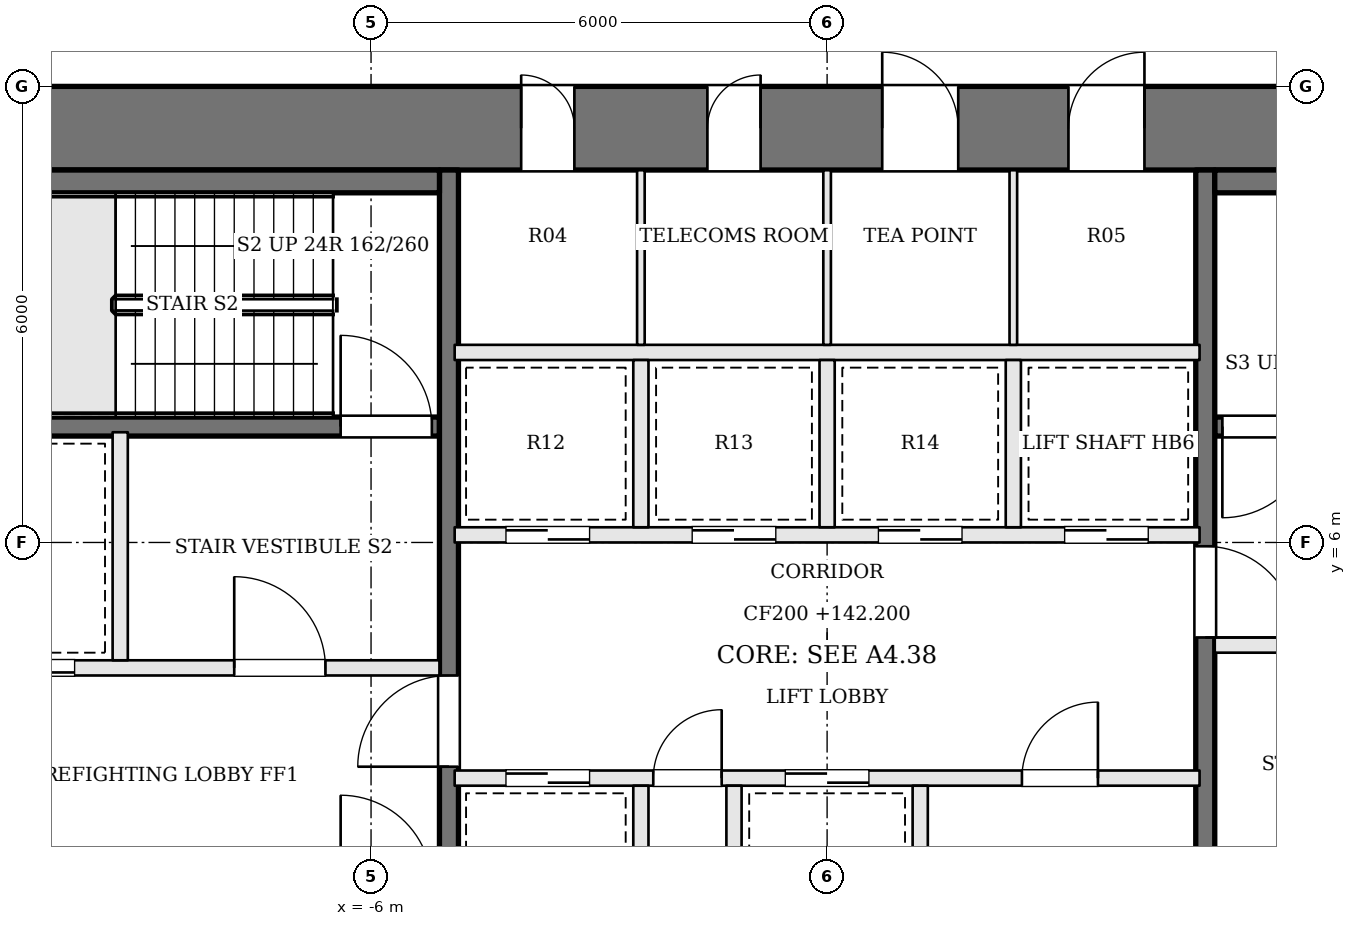
"""IFC4 building model, lengths in metres.
Left out: names, types, materials, properties, quantities, classifications, styles, units other than length and angle.
Written with IfcOpenShell. Run it as: python <this file> out.ifc"""

import sys

from ifc_helpers import new_model, si_unit, direction, frame, frame_2d, origin, place, context, subcontext, project, spatial, rectangle, extrude, element, fill, save


model = new_model("IFC4")
c1 = context("Model", 3, precision=1e-05, world=origin(), true_north=direction((0.0, 1.0)))
c2 = subcontext(c1, "Body", "Model", "MODEL_VIEW")
j1 = project(units=[si_unit("LENGTHUNIT", "METRE"), si_unit("PLANEANGLEUNIT", "RADIAN")], contexts=[c1])
p1 = place(None, origin())
s1 = spatial("IfcSite", under=j1, at=p1, CompositionType="ELEMENT")
p2 = place(p1, origin())
s2 = spatial("IfcBuilding", under=s1, at=p2, CompositionType="ELEMENT")
p3 = place(p2, frame((0.0, 0.0, 142.2)))
s3 = spatial("IfcBuildingStorey", under=s2, at=p3, CompositionType="ELEMENT", Elevation=142.2)
p4 = place(p3, frame((-13.0, 11.45, 0.0), z_axis=(0.0, 0.0, 1.0), x_axis=(1.0, 0.0, 0.0)))
e1 = element("IfcWall", 1, at=p4, inside=s3, PredefinedType="SHEAR", context=c2, shape_type="SweptSolid", body=[
    extrude(rectangle(XDim=26.0, YDim=1.1, at=frame_2d((13.0, 0.0))), origin(), (0.0, 0.0, 1.0), 3.9),
])
p5 = place(p4, frame((8.975, 0.0, 0.0)))
e2 = element("IfcOpeningElement", 2, at=p5, cuts=e1, PredefinedType="OPENING", context=c2, shape_type="SweptSolid", body=[
    extrude(rectangle(XDim=0.7, YDim=2.1, at=frame_2d((0.35, 1.05))), frame((0.0, 0.56, 0.0), z_axis=(0.0, -1.0, 0.0), x_axis=(1.0, 0.0, 0.0)), (0.0, 0.0, 1.0), 1.12),
])
p6 = place(p4, frame((11.425, 0.0, 0.0)))
e3 = element("IfcOpeningElement", 3, at=p6, cuts=e1, PredefinedType="OPENING", context=c2, shape_type="SweptSolid", body=[
    extrude(rectangle(XDim=0.7, YDim=2.1, at=frame_2d((0.35, 1.05))), frame((0.0, 0.56, 0.0), z_axis=(0.0, -1.0, 0.0), x_axis=(1.0, 0.0, 0.0)), (0.0, 0.0, 1.0), 1.12),
])
p7 = place(p4, frame((13.725, 0.0, 0.0)))
e4 = element("IfcOpeningElement", 4, at=p7, cuts=e1, PredefinedType="OPENING", context=c2, shape_type="SweptSolid", body=[
    extrude(rectangle(XDim=1.0, YDim=2.1, at=frame_2d((0.5, 1.05))), frame((0.0, 0.56, 0.0), z_axis=(0.0, -1.0, 0.0), x_axis=(1.0, 0.0, 0.0)), (0.0, 0.0, 1.0), 1.12),
])
p8 = place(p4, frame((16.175, 0.0, 0.0)))
e5 = element("IfcOpeningElement", 5, at=p8, cuts=e1, PredefinedType="OPENING", context=c2, shape_type="SweptSolid", body=[
    extrude(rectangle(XDim=1.0, YDim=2.1, at=frame_2d((0.5, 1.05))), frame((0.0, 0.56, 0.0), z_axis=(0.0, -1.0, 0.0), x_axis=(1.0, 0.0, 0.0)), (0.0, 0.0, 1.0), 1.12),
])
p9 = place(p3, frame((11.9, 7.525, 0.0), z_axis=(0.0, 0.0, 1.0), x_axis=(-1.0, 0.0, 0.0)))
e6 = element("IfcWall", 6, at=p9, inside=s3, PredefinedType="SOLIDWALL", context=c2, shape_type="SweptSolid", body=[
    extrude(rectangle(XDim=6.8, YDim=0.25, at=frame_2d((3.4, 0.0))), origin(), (0.0, 0.0, 1.0), 3.7),
])
p10 = place(p9, frame((5.5, 0.0, 0.0)))
e7 = element("IfcOpeningElement", 7, at=p10, cuts=e6, PredefinedType="OPENING", context=c2, shape_type="SweptSolid", body=[
    extrude(rectangle(XDim=1.2, YDim=2.1, at=frame_2d((0.6, 1.05))), frame((0.0, 0.135, 0.0), z_axis=(0.0, -1.0, 0.0), x_axis=(1.0, 0.0, 0.0)), (0.0, 0.0, 1.0), 0.27),
])
p11 = place(p3, frame((-11.9, 4.35, 0.0), z_axis=(0.0, 0.0, 1.0), x_axis=(1.0, 0.0, 0.0)))
e8 = element("IfcWall", 8, at=p11, inside=s3, PredefinedType="SOLIDWALL", context=c2, shape_type="SweptSolid", body=[
    extrude(rectangle(XDim=6.8, YDim=0.2, at=frame_2d((3.4, 0.0))), origin(), (0.0, 0.0, 1.0), 3.7),
])
p12 = place(p11, frame((4.1, 0.0, 0.0)))
e9 = element("IfcOpeningElement", 9, at=p12, cuts=e8, PredefinedType="OPENING", context=c2, shape_type="SweptSolid", body=[
    extrude(rectangle(XDim=1.2, YDim=2.1, at=frame_2d((0.6, 1.05))), frame((0.0, 0.11, 0.0), z_axis=(0.0, -1.0, 0.0), x_axis=(1.0, 0.0, 0.0)), (0.0, 0.0, 1.0), 0.22),
])
p13 = place(p11, frame((0.8, 0.0, 0.0)))
e10 = element("IfcOpeningElement", 10, at=p13, cuts=e8, PredefinedType="OPENING", context=c2, shape_type="SweptSolid", body=[
    extrude(rectangle(XDim=1.2, YDim=2.1, at=frame_2d((0.6, 1.05))), frame((0.0, 0.11, 0.0), z_axis=(0.0, -1.0, 0.0), x_axis=(1.0, 0.0, 0.0)), (0.0, 0.0, 1.0), 0.22),
])
p14 = place(p3, frame((11.9, 4.65, 0.0), z_axis=(0.0, 0.0, 1.0), x_axis=(-1.0, 0.0, 0.0)))
e11 = element("IfcWall", 11, at=p14, inside=s3, PredefinedType="SOLIDWALL", context=c2, shape_type="SweptSolid", body=[
    extrude(rectangle(XDim=6.8, YDim=0.2, at=frame_2d((3.4, 0.0))), origin(), (0.0, 0.0, 1.0), 3.7),
])
p15 = place(p14, frame((4.1, 0.0, 0.0)))
e12 = element("IfcOpeningElement", 12, at=p15, cuts=e11, PredefinedType="OPENING", context=c2, shape_type="SweptSolid", body=[
    extrude(rectangle(XDim=1.2, YDim=2.1, at=frame_2d((0.6, 1.05))), frame((0.0, 0.11, 0.0), z_axis=(0.0, -1.0, 0.0), x_axis=(1.0, 0.0, 0.0)), (0.0, 0.0, 1.0), 0.22),
])
p16 = place(p14, frame((0.8, 0.0, 0.0)))
e13 = element("IfcOpeningElement", 13, at=p16, cuts=e11, PredefinedType="OPENING", context=c2, shape_type="SweptSolid", body=[
    extrude(rectangle(XDim=1.2, YDim=2.1, at=frame_2d((0.6, 1.05))), frame((0.0, 0.11, 0.0), z_axis=(0.0, -1.0, 0.0), x_axis=(1.0, 0.0, 0.0)), (0.0, 0.0, 1.0), 0.22),
])
p17 = place(p3, frame((-11.9, 7.525, 0.0), z_axis=(0.0, 0.0, 1.0), x_axis=(1.0, 0.0, 0.0)))
e14 = element("IfcWall", 14, at=p17, inside=s3, PredefinedType="SOLIDWALL", context=c2, shape_type="SweptSolid", body=[
    extrude(rectangle(XDim=6.8, YDim=0.25, at=frame_2d((3.4, 0.0))), origin(), (0.0, 0.0, 1.0), 3.7),
])
p18 = place(p17, frame((5.5, 0.0, 0.0)))
e15 = element("IfcOpeningElement", 15, at=p18, cuts=e14, PredefinedType="OPENING", context=c2, shape_type="SweptSolid", body=[
    extrude(rectangle(XDim=1.2, YDim=2.1, at=frame_2d((0.6, 1.05))), frame((0.0, 0.135, 0.0), z_axis=(0.0, -1.0, 0.0), x_axis=(1.0, 0.0, 0.0)), (0.0, 0.0, 1.0), 0.27),
])
p19 = place(p3, frame((-9.3, 4.45, 0.0), z_axis=(0.0, 0.0, 1.0), x_axis=(0.0, 1.0, 0.0)))
e16 = element("IfcWall", 16, at=p19, inside=s3, PredefinedType="SOLIDWALL", context=c2, shape_type="SweptSolid", body=[
    extrude(rectangle(XDim=3.0, YDim=0.2, at=frame_2d((1.5, 0.0))), origin(), (0.0, 0.0, 1.0), 3.7),
])
p20 = place(p3, frame((-4.975, -1.9, 0.0), z_axis=(0.0, 0.0, 1.0), x_axis=(0.0, 1.0, 0.0)))
e17 = element("IfcWall", 17, at=p20, inside=s3, PredefinedType="SOLIDWALL", context=c2, shape_type="SweptSolid", body=[
    extrude(rectangle(XDim=12.8, YDim=0.25, at=frame_2d((6.4, 0.0))), origin(), (0.0, 0.0, 1.0), 3.7),
])
p21 = place(p20, frame((4.95, 0.0, 0.0)))
e18 = element("IfcOpeningElement", 18, at=p21, cuts=e17, PredefinedType="OPENING", context=c2, shape_type="SweptSolid", body=[
    extrude(rectangle(XDim=1.2, YDim=2.1, at=frame_2d((0.6, 1.05))), frame((0.0, 0.135, 0.0), z_axis=(0.0, -1.0, 0.0), x_axis=(1.0, 0.0, 0.0)), (0.0, 0.0, 1.0), 0.27),
])
p22 = place(p3, frame((4.975, 10.9, 0.0), z_axis=(0.0, 0.0, 1.0), x_axis=(0.0, -1.0, 0.0)))
e19 = element("IfcWall", 19, at=p22, inside=s3, PredefinedType="SOLIDWALL", context=c2, shape_type="SweptSolid", body=[
    extrude(rectangle(XDim=12.8, YDim=0.25, at=frame_2d((6.4, 0.0))), origin(), (0.0, 0.0, 1.0), 3.7),
])
p23 = place(p22, frame((4.95, 0.0, 0.0)))
e20 = element("IfcOpeningElement", 20, at=p23, cuts=e19, PredefinedType="OPENING", context=c2, shape_type="SweptSolid", body=[
    extrude(rectangle(XDim=1.2, YDim=2.1, at=frame_2d((0.6, 1.05))), frame((0.0, 0.135, 0.0), z_axis=(0.0, -1.0, 0.0), x_axis=(1.0, 0.0, 0.0)), (0.0, 0.0, 1.0), 0.27),
])
for number, where, z_axis, x_axis in (
    (21, (-11.9, 10.75, 0.0), (0.0, 0.0, 1.0), (1.0, 0.0, 0.0)),
    (22, (11.9, 10.75, 0.0), (0.0, 0.0, 1.0), (-1.0, 0.0, 0.0)),
):
    element("IfcWall", number, at=place(p3, frame(where, z_axis=z_axis, x_axis=x_axis)), inside=s3, PredefinedType="SOLIDWALL", context=c2, shape_type="SweptSolid", body=[
        extrude(rectangle(XDim=6.8, YDim=0.3, at=frame_2d((3.4, 0.0))), origin(), (0.0, 0.0, 1.0), 3.7),
    ])
p24 = place(p3, frame((-4.9, 2.9, 0.0), z_axis=(0.0, 0.0, 1.0), x_axis=(1.0, 0.0, 0.0)))
e23 = element("IfcWall", 23, at=p24, inside=s3, PredefinedType="SOLIDWALL", context=c2, shape_type="SweptSolid", body=[
    extrude(rectangle(XDim=9.8, YDim=0.2, at=frame_2d((4.9, 0.0))), origin(), (0.0, 0.0, 1.0), 3.7),
])
p25 = place(p24, frame((0.675, 0.0, 0.0)))
e24 = element("IfcOpeningElement", 24, at=p25, cuts=e23, PredefinedType="OPENING", context=c2, shape_type="SweptSolid", body=[
    extrude(rectangle(XDim=1.1, YDim=2.1, at=frame_2d((0.55, 1.05))), frame((0.0, 0.11, 0.0), z_axis=(0.0, -1.0, 0.0), x_axis=(1.0, 0.0, 0.0)), (0.0, 0.0, 1.0), 0.22),
])
p26 = place(p24, frame((2.613, 0.0, 0.0)))
e25 = element("IfcOpeningElement", 25, at=p26, cuts=e23, PredefinedType="OPENING", context=c2, shape_type="SweptSolid", body=[
    extrude(rectangle(XDim=0.9, YDim=2.1, at=frame_2d((0.45, 1.05))), frame((0.0, 0.11, 0.0), z_axis=(0.0, -1.0, 0.0), x_axis=(1.0, 0.0, 0.0)), (0.0, 0.0, 1.0), 0.22),
])
p27 = place(p24, frame((4.35, 0.0, 0.0)))
e26 = element("IfcOpeningElement", 26, at=p27, cuts=e23, PredefinedType="OPENING", context=c2, shape_type="SweptSolid", body=[
    extrude(rectangle(XDim=1.1, YDim=2.1, at=frame_2d((0.55, 1.05))), frame((0.0, 0.11, 0.0), z_axis=(0.0, -1.0, 0.0), x_axis=(1.0, 0.0, 0.0)), (0.0, 0.0, 1.0), 0.22),
])
p28 = place(p24, frame((7.463, 0.0, 0.0)))
e27 = element("IfcOpeningElement", 27, at=p28, cuts=e23, PredefinedType="OPENING", context=c2, shape_type="SweptSolid", body=[
    extrude(rectangle(XDim=1.0, YDim=2.1, at=frame_2d((0.5, 1.05))), frame((0.0, 0.11, 0.0), z_axis=(0.0, -1.0, 0.0), x_axis=(1.0, 0.0, 0.0)), (0.0, 0.0, 1.0), 0.22),
])
p29 = place(p3, frame((-4.9, 6.1, 0.0), z_axis=(0.0, 0.0, 1.0), x_axis=(1.0, 0.0, 0.0)))
e28 = element("IfcWall", 28, at=p29, inside=s3, PredefinedType="SOLIDWALL", context=c2, shape_type="SweptSolid", body=[
    extrude(rectangle(XDim=9.8, YDim=0.2, at=frame_2d((4.9, 0.0))), origin(), (0.0, 0.0, 1.0), 3.7),
])
p30 = place(p29, frame((0.675, 0.0, 0.0)))
e29 = element("IfcOpeningElement", 29, at=p30, cuts=e28, PredefinedType="OPENING", context=c2, shape_type="SweptSolid", body=[
    extrude(rectangle(XDim=1.1, YDim=2.1, at=frame_2d((0.55, 1.05))), frame((0.0, 0.11, 0.0), z_axis=(0.0, -1.0, 0.0), x_axis=(1.0, 0.0, 0.0)), (0.0, 0.0, 1.0), 0.22),
])
p31 = place(p29, frame((3.125, 0.0, 0.0)))
e30 = element("IfcOpeningElement", 30, at=p31, cuts=e28, PredefinedType="OPENING", context=c2, shape_type="SweptSolid", body=[
    extrude(rectangle(XDim=1.1, YDim=2.1, at=frame_2d((0.55, 1.05))), frame((0.0, 0.11, 0.0), z_axis=(0.0, -1.0, 0.0), x_axis=(1.0, 0.0, 0.0)), (0.0, 0.0, 1.0), 0.22),
])
p32 = place(p29, frame((5.575, 0.0, 0.0)))
e31 = element("IfcOpeningElement", 31, at=p32, cuts=e28, PredefinedType="OPENING", context=c2, shape_type="SweptSolid", body=[
    extrude(rectangle(XDim=1.1, YDim=2.1, at=frame_2d((0.55, 1.05))), frame((0.0, 0.11, 0.0), z_axis=(0.0, -1.0, 0.0), x_axis=(1.0, 0.0, 0.0)), (0.0, 0.0, 1.0), 0.22),
])
p33 = place(p29, frame((8.025, 0.0, 0.0)))
e32 = element("IfcOpeningElement", 32, at=p33, cuts=e28, PredefinedType="OPENING", context=c2, shape_type="SweptSolid", body=[
    extrude(rectangle(XDim=1.1, YDim=2.1, at=frame_2d((0.55, 1.05))), frame((0.0, 0.11, 0.0), z_axis=(0.0, -1.0, 0.0), x_axis=(1.0, 0.0, 0.0)), (0.0, 0.0, 1.0), 0.22),
])
p34 = place(p3, frame((-4.9, 8.5, 0.0), z_axis=(0.0, 0.0, 1.0), x_axis=(1.0, 0.0, 0.0)))
e33 = element("IfcWall", 33, at=p34, inside=s3, PredefinedType="SOLIDWALL", context=c2, shape_type="SweptSolid", body=[
    extrude(rectangle(XDim=9.8, YDim=0.2, at=frame_2d((4.9, 0.0))), origin(), (0.0, 0.0, 1.0), 3.7),
])
for number, where, z_axis, x_axis in (
    (34, (-2.45, 0.6, 0.0), (0.0, 0.0, 1.0), (0.0, 1.0, 0.0)),
    (35, (-1.225, 0.6, 0.0), (0.0, 0.0, 1.0), (0.0, 1.0, 0.0)),
    (36, (1.225, 0.6, 0.0), (0.0, 0.0, 1.0), (0.0, 1.0, 0.0)),
    (37, (-2.45, 6.2, 0.0), (0.0, 0.0, 1.0), (0.0, 1.0, 0.0)),
    (38, (0.0, 6.2, 0.0), (0.0, 0.0, 1.0), (0.0, 1.0, 0.0)),
    (39, (2.45, 6.2, 0.0), (0.0, 0.0, 1.0), (0.0, 1.0, 0.0)),
):
    element("IfcWall", number, at=place(p3, frame(where, z_axis=z_axis, x_axis=x_axis)), inside=s3, PredefinedType="SOLIDWALL", context=c2, shape_type="SweptSolid", body=[
        extrude(rectangle(XDim=2.2, YDim=0.2, at=frame_2d((1.1, 0.0))), origin(), (0.0, 0.0, 1.0), 3.7),
    ])
for number, where, z_axis, x_axis in (
    (40, (-2.45, 8.6, 0.0), (0.0, 0.0, 1.0), (0.0, 1.0, 0.0)),
    (41, (0.0, 8.6, 0.0), (0.0, 0.0, 1.0), (0.0, 1.0, 0.0)),
    (42, (2.45, 8.6, 0.0), (0.0, 0.0, 1.0), (0.0, 1.0, 0.0)),
):
    element("IfcWall", number, at=place(p3, frame(where, z_axis=z_axis, x_axis=x_axis)), inside=s3, PredefinedType="PARTITIONING", context=c2, shape_type="SweptSolid", body=[
        extrude(rectangle(XDim=2.3, YDim=0.1, at=frame_2d((1.15, 0.0))), origin(), (0.0, 0.0, 1.0), 3.7),
    ])
p35 = place(p21, origin())
e43 = element("IfcDoor", 43, at=p35, inside=s3, OperationType="SINGLE_SWING_LEFT", PredefinedType="DOOR", context=c2, shape_type="SweptSolid", body=[
    extrude(rectangle(XDim=1.2, YDim=2.1, at=frame_2d((0.6, 1.05))), frame((0.0, 0.025, 0.0), z_axis=(0.0, -1.0, 0.0), x_axis=(1.0, 0.0, 0.0)), (0.0, 0.0, 1.0), 0.05),
])
fill(e18, e43)
p36 = place(p23, origin())
e44 = element("IfcDoor", 44, at=p36, inside=s3, OperationType="SINGLE_SWING_RIGHT", PredefinedType="DOOR", context=c2, shape_type="SweptSolid", body=[
    extrude(rectangle(XDim=1.2, YDim=2.1, at=frame_2d((0.6, 1.05))), frame((0.0, 0.025, 0.0), z_axis=(0.0, -1.0, 0.0), x_axis=(1.0, 0.0, 0.0)), (0.0, 0.0, 1.0), 0.05),
])
fill(e20, e44)
p37 = place(p12, origin())
e45 = element("IfcDoor", 45, at=p37, inside=s3, OperationType="SINGLE_SWING_LEFT", PredefinedType="DOOR", context=c2, shape_type="SweptSolid", body=[
    extrude(rectangle(XDim=1.2, YDim=2.1, at=frame_2d((0.6, 1.05))), frame((0.0, 0.025, 0.0), z_axis=(0.0, -1.0, 0.0), x_axis=(1.0, 0.0, 0.0)), (0.0, 0.0, 1.0), 0.05),
])
fill(e9, e45)
p38 = place(p10, origin())
e46 = element("IfcDoor", 46, at=p38, inside=s3, OperationType="SINGLE_SWING_RIGHT", PredefinedType="DOOR", context=c2, shape_type="SweptSolid", body=[
    extrude(rectangle(XDim=1.2, YDim=2.1, at=frame_2d((0.6, 1.05))), frame((0.0, 0.025, 0.0), z_axis=(0.0, -1.0, 0.0), x_axis=(1.0, 0.0, 0.0)), (0.0, 0.0, 1.0), 0.05),
])
fill(e7, e46)
p39 = place(p18, origin())
e47 = element("IfcDoor", 47, at=p39, inside=s3, OperationType="SINGLE_SWING_LEFT", PredefinedType="DOOR", context=c2, shape_type="SweptSolid", body=[
    extrude(rectangle(XDim=1.2, YDim=2.1, at=frame_2d((0.6, 1.05))), frame((0.0, 0.025, 0.0), z_axis=(0.0, -1.0, 0.0), x_axis=(1.0, 0.0, 0.0)), (0.0, 0.0, 1.0), 0.05),
])
fill(e15, e47)
p40 = place(p13, origin())
e48 = element("IfcDoor", 48, at=p40, inside=s3, OperationType="SLIDING_TO_RIGHT", PredefinedType="DOOR", context=c2, shape_type="SweptSolid", body=[
    extrude(rectangle(XDim=1.2, YDim=2.1, at=frame_2d((0.6, 1.05))), frame((0.0, 0.025, 0.0), z_axis=(0.0, -1.0, 0.0), x_axis=(1.0, 0.0, 0.0)), (0.0, 0.0, 1.0), 0.05),
])
fill(e10, e48)
p41 = place(p25, origin())
e49 = element("IfcDoor", 49, at=p41, inside=s3, OperationType="SLIDING_TO_RIGHT", PredefinedType="DOOR", context=c2, shape_type="SweptSolid", body=[
    extrude(rectangle(XDim=1.1, YDim=2.1, at=frame_2d((0.55, 1.05))), frame((0.0, 0.025, 0.0), z_axis=(0.0, -1.0, 0.0), x_axis=(1.0, 0.0, 0.0)), (0.0, 0.0, 1.0), 0.05),
])
fill(e24, e49)
p42 = place(p26, origin())
e50 = element("IfcDoor", 50, at=p42, inside=s3, OperationType="SINGLE_SWING_RIGHT", PredefinedType="DOOR", context=c2, shape_type="SweptSolid", body=[
    extrude(rectangle(XDim=0.9, YDim=2.1, at=frame_2d((0.45, 1.05))), frame((0.0, 0.025, 0.0), z_axis=(0.0, -1.0, 0.0), x_axis=(1.0, 0.0, 0.0)), (0.0, 0.0, 1.0), 0.05),
])
fill(e25, e50)
p43 = place(p27, origin())
e51 = element("IfcDoor", 51, at=p43, inside=s3, OperationType="SLIDING_TO_LEFT", PredefinedType="DOOR", context=c2, shape_type="SweptSolid", body=[
    extrude(rectangle(XDim=1.1, YDim=2.1, at=frame_2d((0.55, 1.05))), frame((0.0, 0.025, 0.0), z_axis=(0.0, -1.0, 0.0), x_axis=(1.0, 0.0, 0.0)), (0.0, 0.0, 1.0), 0.05),
])
fill(e26, e51)
p44 = place(p28, origin())
e52 = element("IfcDoor", 52, at=p44, inside=s3, OperationType="SINGLE_SWING_RIGHT", PredefinedType="DOOR", context=c2, shape_type="SweptSolid", body=[
    extrude(rectangle(XDim=1.0, YDim=2.1, at=frame_2d((0.5, 1.05))), frame((0.0, 0.025, 0.0), z_axis=(0.0, -1.0, 0.0), x_axis=(1.0, 0.0, 0.0)), (0.0, 0.0, 1.0), 0.05),
])
fill(e27, e52)
p45 = place(p30, origin())
e53 = element("IfcDoor", 53, at=p45, inside=s3, OperationType="SLIDING_TO_RIGHT", PredefinedType="DOOR", context=c2, shape_type="SweptSolid", body=[
    extrude(rectangle(XDim=1.1, YDim=2.1, at=frame_2d((0.55, 1.05))), frame((0.0, 0.025, 0.0), z_axis=(0.0, -1.0, 0.0), x_axis=(1.0, 0.0, 0.0)), (0.0, 0.0, 1.0), 0.05),
])
fill(e29, e53)
p46 = place(p31, origin())
e54 = element("IfcDoor", 54, at=p46, inside=s3, OperationType="SLIDING_TO_LEFT", PredefinedType="DOOR", context=c2, shape_type="SweptSolid", body=[
    extrude(rectangle(XDim=1.1, YDim=2.1, at=frame_2d((0.55, 1.05))), frame((0.0, 0.025, 0.0), z_axis=(0.0, -1.0, 0.0), x_axis=(1.0, 0.0, 0.0)), (0.0, 0.0, 1.0), 0.05),
])
fill(e30, e54)
p47 = place(p32, origin())
e55 = element("IfcDoor", 55, at=p47, inside=s3, OperationType="SLIDING_TO_RIGHT", PredefinedType="DOOR", context=c2, shape_type="SweptSolid", body=[
    extrude(rectangle(XDim=1.1, YDim=2.1, at=frame_2d((0.55, 1.05))), frame((0.0, 0.025, 0.0), z_axis=(0.0, -1.0, 0.0), x_axis=(1.0, 0.0, 0.0)), (0.0, 0.0, 1.0), 0.05),
])
fill(e31, e55)
p48 = place(p33, origin())
e56 = element("IfcDoor", 56, at=p48, inside=s3, OperationType="SLIDING_TO_LEFT", PredefinedType="DOOR", context=c2, shape_type="SweptSolid", body=[
    extrude(rectangle(XDim=1.1, YDim=2.1, at=frame_2d((0.55, 1.05))), frame((0.0, 0.025, 0.0), z_axis=(0.0, -1.0, 0.0), x_axis=(1.0, 0.0, 0.0)), (0.0, 0.0, 1.0), 0.05),
])
fill(e32, e56)
p49 = place(p5, origin())
e57 = element("IfcDoor", 57, at=p49, inside=s3, OperationType="SINGLE_SWING_LEFT", PredefinedType="DOOR", context=c2, shape_type="SweptSolid", body=[
    extrude(rectangle(XDim=0.7, YDim=2.1, at=frame_2d((0.35, 1.05))), frame((0.0, 0.025, 0.0), z_axis=(0.0, -1.0, 0.0), x_axis=(1.0, 0.0, 0.0)), (0.0, 0.0, 1.0), 0.05),
])
fill(e2, e57)
p50 = place(p6, origin())
e58 = element("IfcDoor", 58, at=p50, inside=s3, OperationType="SINGLE_SWING_RIGHT", PredefinedType="DOOR", context=c2, shape_type="SweptSolid", body=[
    extrude(rectangle(XDim=0.7, YDim=2.1, at=frame_2d((0.35, 1.05))), frame((0.0, 0.025, 0.0), z_axis=(0.0, -1.0, 0.0), x_axis=(1.0, 0.0, 0.0)), (0.0, 0.0, 1.0), 0.05),
])
fill(e3, e58)
p51 = place(p7, origin())
e59 = element("IfcDoor", 59, at=p51, inside=s3, OperationType="SINGLE_SWING_LEFT", PredefinedType="DOOR", context=c2, shape_type="SweptSolid", body=[
    extrude(rectangle(XDim=1.0, YDim=2.1, at=frame_2d((0.5, 1.05))), frame((0.0, 0.025, 0.0), z_axis=(0.0, -1.0, 0.0), x_axis=(1.0, 0.0, 0.0)), (0.0, 0.0, 1.0), 0.05),
])
fill(e4, e59)
p52 = place(p8, origin())
e60 = element("IfcDoor", 60, at=p52, inside=s3, OperationType="SINGLE_SWING_RIGHT", PredefinedType="DOOR", context=c2, shape_type="SweptSolid", body=[
    extrude(rectangle(XDim=1.0, YDim=2.1, at=frame_2d((0.5, 1.05))), frame((0.0, 0.025, 0.0), z_axis=(0.0, -1.0, 0.0), x_axis=(1.0, 0.0, 0.0)), (0.0, 0.0, 1.0), 0.05),
])
fill(e5, e60)
save(model, sys.argv[1])
